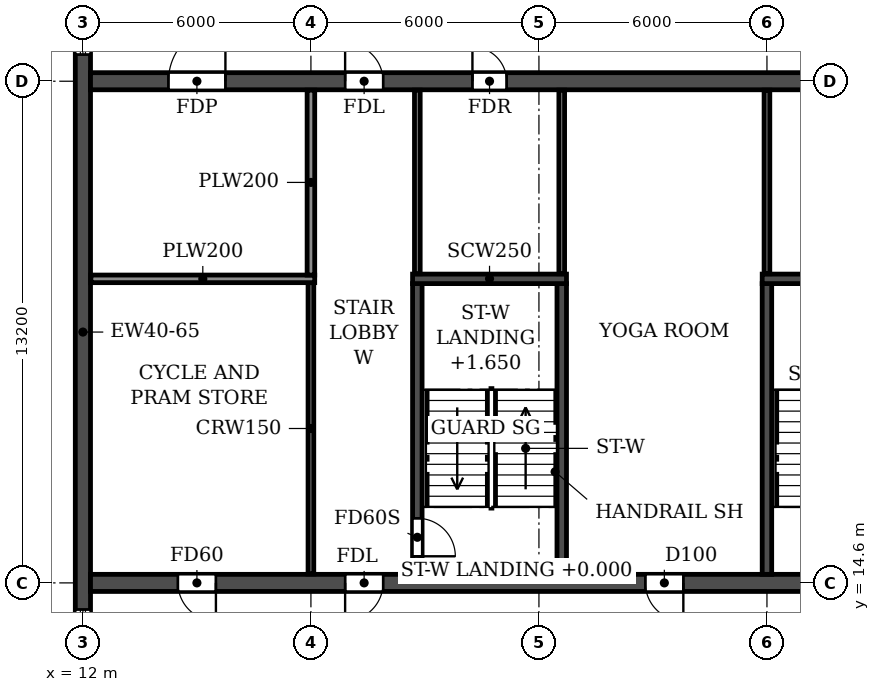
"""IFC4 building model, lengths in metres.
Left out: names, types, materials, properties, quantities, classifications, styles, units other than length and angle.
Written with IfcOpenShell. Run it as: python <this file> out.ifc"""

import sys

from ifc_helpers import new_model, si_unit, direction, frame, frame_2d, origin, place, context, subcontext, project, spatial, rectangle, extrude, element, fill, save


model = new_model("IFC4")
c1 = context("Model", 3, precision=1e-05, world=origin(), true_north=direction((0.0, 1.0)))
c2 = subcontext(c1, "Body", "Model", "MODEL_VIEW")
j1 = project(units=[si_unit("LENGTHUNIT", "METRE"), si_unit("PLANEANGLEUNIT", "RADIAN")], contexts=[c1])
p1 = place(None, origin())
s1 = spatial("IfcSite", under=j1, at=p1, CompositionType="ELEMENT")
p2 = place(p1, origin())
s2 = spatial("IfcBuilding", under=s1, at=p2, CompositionType="ELEMENT")
p3 = place(p2, frame((0.0, 0.0, 132.3)))
s3 = spatial("IfcBuildingStorey", under=s2, at=p3, CompositionType="ELEMENT", Elevation=132.3)
p4 = place(p3, frame((12.0, 4.683, 0.0), z_axis=(0.0, 0.0, 1.0), x_axis=(0.0, 1.0, 0.0)))
e1 = element("IfcWall", 1, at=p4, inside=s3, PredefinedType="SHEAR", context=c2, shape_type="SweptSolid", body=[
    extrude(rectangle(XDim=33.034, YDim=0.4, at=frame_2d((16.517, 0.0))), origin(), (0.0, 0.0, 1.0), 3.07),
])
p5 = place(p4, frame((23.817, 0.0, 0.9)))
e2 = element("IfcOpeningElement", 2, at=p5, cuts=e1, PredefinedType="OPENING", context=c2, shape_type="SweptSolid", body=[
    extrude(rectangle(XDim=1.2, YDim=1.5, at=frame_2d((0.6, 0.75))), frame((0.0, 0.21, 0.0), z_axis=(0.0, -1.0, 0.0), x_axis=(1.0, 0.0, 0.0)), (0.0, 0.0, 1.0), 0.42),
])
p6 = place(p4, frame((8.017, 0.0, 0.9)))
e3 = element("IfcOpeningElement", 3, at=p6, cuts=e1, PredefinedType="OPENING", context=c2, shape_type="SweptSolid", body=[
    extrude(rectangle(XDim=1.2, YDim=1.5, at=frame_2d((0.6, 0.75))), frame((0.0, 0.21, 0.0), z_axis=(0.0, -1.0, 0.0), x_axis=(1.0, 0.0, 0.0)), (0.0, 0.0, 1.0), 0.42),
])
p7 = place(p4, frame((28.293, 0.0, 0.6)))
e4 = element("IfcOpeningElement", 4, at=p7, cuts=e1, PredefinedType="OPENING", context=c2, shape_type="SweptSolid", body=[
    extrude(rectangle(XDim=2.2, YDim=1.8, at=frame_2d((1.1, 0.9))), frame((0.0, 0.21, 0.0), z_axis=(0.0, -1.0, 0.0), x_axis=(1.0, 0.0, 0.0)), (0.0, 0.0, 1.0), 0.42),
])
p8 = place(p4, frame((2.541, 0.0, 0.6)))
e5 = element("IfcOpeningElement", 5, at=p8, cuts=e1, PredefinedType="OPENING", context=c2, shape_type="SweptSolid", body=[
    extrude(rectangle(XDim=2.2, YDim=1.8, at=frame_2d((1.1, 0.9))), frame((0.0, 0.21, 0.0), z_axis=(0.0, -1.0, 0.0), x_axis=(1.0, 0.0, 0.0)), (0.0, 0.0, 1.0), 0.42),
])
p9 = place(p3, frame((12.2, 14.6, 0.0), z_axis=(0.0, 0.0, 1.0), x_axis=(1.0, 0.0, 0.0)))
e6 = element("IfcWall", 6, at=p9, inside=s3, PredefinedType="SOLIDWALL", context=c2, shape_type="SweptSolid", body=[
    extrude(rectangle(XDim=77.6, YDim=0.45, at=frame_2d((38.8, 0.0))), origin(), (0.0, 0.0, 1.0), 3.07),
])
p10 = place(p9, frame((2.3, 0.0, 0.0)))
e7 = element("IfcOpeningElement", 7, at=p10, cuts=e6, PredefinedType="OPENING", context=c2, shape_type="SweptSolid", body=[
    extrude(rectangle(XDim=1.0, YDim=2.1, at=frame_2d((0.5, 1.05))), frame((0.0, 0.235, 0.0), z_axis=(0.0, -1.0, 0.0), x_axis=(1.0, 0.0, 0.0)), (0.0, 0.0, 1.0), 0.47),
])
p11 = place(p9, frame((6.7, 0.0, 0.0)))
e8 = element("IfcOpeningElement", 8, at=p11, cuts=e6, PredefinedType="OPENING", context=c2, shape_type="SweptSolid", body=[
    extrude(rectangle(XDim=1.0, YDim=2.1, at=frame_2d((0.5, 1.05))), frame((0.0, 0.235, 0.0), z_axis=(0.0, -1.0, 0.0), x_axis=(1.0, 0.0, 0.0)), (0.0, 0.0, 1.0), 0.47),
])
p12 = place(p9, frame((14.6, 0.0, 0.0)))
e9 = element("IfcOpeningElement", 9, at=p12, cuts=e6, PredefinedType="OPENING", context=c2, shape_type="SweptSolid", body=[
    extrude(rectangle(XDim=1.0, YDim=2.1, at=frame_2d((0.5, 1.05))), frame((0.0, 0.235, 0.0), z_axis=(0.0, -1.0, 0.0), x_axis=(1.0, 0.0, 0.0)), (0.0, 0.0, 1.0), 0.47),
])
p13 = place(p9, frame((19.2, 0.0, 0.0)))
e10 = element("IfcOpeningElement", 10, at=p13, cuts=e6, PredefinedType="OPENING", context=c2, shape_type="SweptSolid", body=[
    extrude(rectangle(XDim=1.0, YDim=2.1, at=frame_2d((0.5, 1.05))), frame((0.0, 0.235, 0.0), z_axis=(0.0, -1.0, 0.0), x_axis=(1.0, 0.0, 0.0)), (0.0, 0.0, 1.0), 0.47),
])
p14 = place(p9, frame((31.55, 0.0, 0.0)))
e11 = element("IfcOpeningElement", 11, at=p14, cuts=e6, PredefinedType="OPENING", context=c2, shape_type="SweptSolid", body=[
    extrude(rectangle(XDim=1.5, YDim=2.1, at=frame_2d((0.75, 1.05))), frame((0.0, 0.235, 0.0), z_axis=(0.0, -1.0, 0.0), x_axis=(1.0, 0.0, 0.0)), (0.0, 0.0, 1.0), 0.47),
])
p15 = place(p9, frame((35.7, 0.0, 0.0)))
e12 = element("IfcOpeningElement", 12, at=p15, cuts=e6, PredefinedType="OPENING", context=c2, shape_type="SweptSolid", body=[
    extrude(rectangle(XDim=1.0, YDim=2.1, at=frame_2d((0.5, 1.05))), frame((0.0, 0.235, 0.0), z_axis=(0.0, -1.0, 0.0), x_axis=(1.0, 0.0, 0.0)), (0.0, 0.0, 1.0), 0.47),
])
p16 = place(p9, frame((38.3, 0.0, 0.0)))
e13 = element("IfcOpeningElement", 13, at=p16, cuts=e6, PredefinedType="OPENING", context=c2, shape_type="SweptSolid", body=[
    extrude(rectangle(XDim=1.0, YDim=2.1, at=frame_2d((0.5, 1.05))), frame((0.0, 0.235, 0.0), z_axis=(0.0, -1.0, 0.0), x_axis=(1.0, 0.0, 0.0)), (0.0, 0.0, 1.0), 0.47),
])
p17 = place(p9, frame((40.9, 0.0, 0.0)))
e14 = element("IfcOpeningElement", 14, at=p17, cuts=e6, PredefinedType="OPENING", context=c2, shape_type="SweptSolid", body=[
    extrude(rectangle(XDim=1.0, YDim=2.1, at=frame_2d((0.5, 1.05))), frame((0.0, 0.235, 0.0), z_axis=(0.0, -1.0, 0.0), x_axis=(1.0, 0.0, 0.0)), (0.0, 0.0, 1.0), 0.47),
])
p18 = place(p9, frame((44.55, 0.0, 0.0)))
e15 = element("IfcOpeningElement", 15, at=p18, cuts=e6, PredefinedType="OPENING", context=c2, shape_type="SweptSolid", body=[
    extrude(rectangle(XDim=1.5, YDim=2.1, at=frame_2d((0.75, 1.05))), frame((0.0, 0.235, 0.0), z_axis=(0.0, -1.0, 0.0), x_axis=(1.0, 0.0, 0.0)), (0.0, 0.0, 1.0), 0.47),
])
p19 = place(p9, frame((57.4, 0.0, 0.0)))
e16 = element("IfcOpeningElement", 16, at=p19, cuts=e6, PredefinedType="OPENING", context=c2, shape_type="SweptSolid", body=[
    extrude(rectangle(XDim=1.0, YDim=2.1, at=frame_2d((0.5, 1.05))), frame((0.0, 0.235, 0.0), z_axis=(0.0, -1.0, 0.0), x_axis=(1.0, 0.0, 0.0)), (0.0, 0.0, 1.0), 0.47),
])
p20 = place(p9, frame((62.0, 0.0, 0.0)))
e17 = element("IfcOpeningElement", 17, at=p20, cuts=e6, PredefinedType="OPENING", context=c2, shape_type="SweptSolid", body=[
    extrude(rectangle(XDim=1.0, YDim=2.1, at=frame_2d((0.5, 1.05))), frame((0.0, 0.235, 0.0), z_axis=(0.0, -1.0, 0.0), x_axis=(1.0, 0.0, 0.0)), (0.0, 0.0, 1.0), 0.47),
])
p21 = place(p9, frame((69.9, 0.0, 0.0)))
e18 = element("IfcOpeningElement", 18, at=p21, cuts=e6, PredefinedType="OPENING", context=c2, shape_type="SweptSolid", body=[
    extrude(rectangle(XDim=1.0, YDim=2.1, at=frame_2d((0.5, 1.05))), frame((0.0, 0.235, 0.0), z_axis=(0.0, -1.0, 0.0), x_axis=(1.0, 0.0, 0.0)), (0.0, 0.0, 1.0), 0.47),
])
p22 = place(p9, frame((74.3, 0.0, 0.0)))
e19 = element("IfcOpeningElement", 19, at=p22, cuts=e6, PredefinedType="OPENING", context=c2, shape_type="SweptSolid", body=[
    extrude(rectangle(XDim=1.0, YDim=2.1, at=frame_2d((0.5, 1.05))), frame((0.0, 0.235, 0.0), z_axis=(0.0, -1.0, 0.0), x_axis=(1.0, 0.0, 0.0)), (0.0, 0.0, 1.0), 0.47),
])
p23 = place(p3, frame((12.2, 27.8, 0.0), z_axis=(0.0, 0.0, 1.0), x_axis=(1.0, 0.0, 0.0)))
e20 = element("IfcWall", 20, at=p23, inside=s3, PredefinedType="SOLIDWALL", context=c2, shape_type="SweptSolid", body=[
    extrude(rectangle(XDim=77.6, YDim=0.45, at=frame_2d((38.8, 0.0))), origin(), (0.0, 0.0, 1.0), 3.07),
])
p24 = place(p23, frame((2.05, 0.0, 0.0)))
e21 = element("IfcOpeningElement", 21, at=p24, cuts=e20, PredefinedType="OPENING", context=c2, shape_type="SweptSolid", body=[
    extrude(rectangle(XDim=1.5, YDim=2.1, at=frame_2d((0.75, 1.05))), frame((0.0, 0.235, 0.0), z_axis=(0.0, -1.0, 0.0), x_axis=(1.0, 0.0, 0.0)), (0.0, 0.0, 1.0), 0.47),
])
p25 = place(p23, frame((6.7, 0.0, 0.0)))
e22 = element("IfcOpeningElement", 22, at=p25, cuts=e20, PredefinedType="OPENING", context=c2, shape_type="SweptSolid", body=[
    extrude(rectangle(XDim=1.0, YDim=2.1, at=frame_2d((0.5, 1.05))), frame((0.0, 0.235, 0.0), z_axis=(0.0, -1.0, 0.0), x_axis=(1.0, 0.0, 0.0)), (0.0, 0.0, 1.0), 0.47),
])
p26 = place(p23, frame((10.05, 0.0, 0.0)))
e23 = element("IfcOpeningElement", 23, at=p26, cuts=e20, PredefinedType="OPENING", context=c2, shape_type="SweptSolid", body=[
    extrude(rectangle(XDim=0.9, YDim=2.1, at=frame_2d((0.45, 1.05))), frame((0.0, 0.235, 0.0), z_axis=(0.0, -1.0, 0.0), x_axis=(1.0, 0.0, 0.0)), (0.0, 0.0, 1.0), 0.47),
])
p27 = place(p23, frame((19.25, 0.0, 0.0)))
e24 = element("IfcOpeningElement", 24, at=p27, cuts=e20, PredefinedType="OPENING", context=c2, shape_type="SweptSolid", body=[
    extrude(rectangle(XDim=0.9, YDim=2.1, at=frame_2d((0.45, 1.05))), frame((0.0, 0.235, 0.0), z_axis=(0.0, -1.0, 0.0), x_axis=(1.0, 0.0, 0.0)), (0.0, 0.0, 1.0), 0.47),
])
p28 = place(p23, frame((22.4, 0.0, 0.0)))
e25 = element("IfcOpeningElement", 25, at=p28, cuts=e20, PredefinedType="OPENING", context=c2, shape_type="SweptSolid", body=[
    extrude(rectangle(XDim=1.0, YDim=2.1, at=frame_2d((0.5, 1.05))), frame((0.0, 0.235, 0.0), z_axis=(0.0, -1.0, 0.0), x_axis=(1.0, 0.0, 0.0)), (0.0, 0.0, 1.0), 0.47),
])
p29 = place(p23, frame((27.6, 0.0, 0.0)))
e26 = element("IfcOpeningElement", 26, at=p29, cuts=e20, PredefinedType="OPENING", context=c2, shape_type="SweptSolid", body=[
    extrude(rectangle(XDim=1.0, YDim=2.1, at=frame_2d((0.5, 1.05))), frame((0.0, 0.235, 0.0), z_axis=(0.0, -1.0, 0.0), x_axis=(1.0, 0.0, 0.0)), (0.0, 0.0, 1.0), 0.47),
])
p30 = place(p23, frame((35.4, 0.0, 0.0)))
e27 = element("IfcOpeningElement", 27, at=p30, cuts=e20, PredefinedType="OPENING", context=c2, shape_type="SweptSolid", body=[
    extrude(rectangle(XDim=1.0, YDim=2.1, at=frame_2d((0.5, 1.05))), frame((0.0, 0.235, 0.0), z_axis=(0.0, -1.0, 0.0), x_axis=(1.0, 0.0, 0.0)), (0.0, 0.0, 1.0), 0.47),
])
p31 = place(p23, frame((38.3, 0.0, 0.0)))
e28 = element("IfcOpeningElement", 28, at=p31, cuts=e20, PredefinedType="OPENING", context=c2, shape_type="SweptSolid", body=[
    extrude(rectangle(XDim=1.0, YDim=2.1, at=frame_2d((0.5, 1.05))), frame((0.0, 0.235, 0.0), z_axis=(0.0, -1.0, 0.0), x_axis=(1.0, 0.0, 0.0)), (0.0, 0.0, 1.0), 0.47),
])
p32 = place(p23, frame((41.2, 0.0, 0.0)))
e29 = element("IfcOpeningElement", 29, at=p32, cuts=e20, PredefinedType="OPENING", context=c2, shape_type="SweptSolid", body=[
    extrude(rectangle(XDim=1.0, YDim=2.1, at=frame_2d((0.5, 1.05))), frame((0.0, 0.235, 0.0), z_axis=(0.0, -1.0, 0.0), x_axis=(1.0, 0.0, 0.0)), (0.0, 0.0, 1.0), 0.47),
])
p33 = place(p23, frame((43.8, 0.0, 0.0)))
e30 = element("IfcOpeningElement", 30, at=p33, cuts=e20, PredefinedType="OPENING", context=c2, shape_type="SweptSolid", body=[
    extrude(rectangle(XDim=1.0, YDim=2.1, at=frame_2d((0.5, 1.05))), frame((0.0, 0.235, 0.0), z_axis=(0.0, -1.0, 0.0), x_axis=(1.0, 0.0, 0.0)), (0.0, 0.0, 1.0), 0.47),
])
p34 = place(p23, frame((47.7, 0.0, 0.0)))
e31 = element("IfcOpeningElement", 31, at=p34, cuts=e20, PredefinedType="OPENING", context=c2, shape_type="SweptSolid", body=[
    extrude(rectangle(XDim=1.0, YDim=2.1, at=frame_2d((0.5, 1.05))), frame((0.0, 0.235, 0.0), z_axis=(0.0, -1.0, 0.0), x_axis=(1.0, 0.0, 0.0)), (0.0, 0.0, 1.0), 0.47),
])
p35 = place(p23, frame((51.6, 0.0, 0.0)))
e32 = element("IfcOpeningElement", 32, at=p35, cuts=e20, PredefinedType="OPENING", context=c2, shape_type="SweptSolid", body=[
    extrude(rectangle(XDim=1.0, YDim=2.1, at=frame_2d((0.5, 1.05))), frame((0.0, 0.235, 0.0), z_axis=(0.0, -1.0, 0.0), x_axis=(1.0, 0.0, 0.0)), (0.0, 0.0, 1.0), 0.47),
])
p36 = place(p23, frame((54.2, 0.0, 0.0)))
e33 = element("IfcOpeningElement", 33, at=p36, cuts=e20, PredefinedType="OPENING", context=c2, shape_type="SweptSolid", body=[
    extrude(rectangle(XDim=1.0, YDim=2.1, at=frame_2d((0.5, 1.05))), frame((0.0, 0.235, 0.0), z_axis=(0.0, -1.0, 0.0), x_axis=(1.0, 0.0, 0.0)), (0.0, 0.0, 1.0), 0.47),
])
p37 = place(p23, frame((57.45, 0.0, 0.0)))
e34 = element("IfcOpeningElement", 34, at=p37, cuts=e20, PredefinedType="OPENING", context=c2, shape_type="SweptSolid", body=[
    extrude(rectangle(XDim=0.9, YDim=2.1, at=frame_2d((0.45, 1.05))), frame((0.0, 0.235, 0.0), z_axis=(0.0, -1.0, 0.0), x_axis=(1.0, 0.0, 0.0)), (0.0, 0.0, 1.0), 0.47),
])
p38 = place(p23, frame((66.65, 0.0, 0.0)))
e35 = element("IfcOpeningElement", 35, at=p38, cuts=e20, PredefinedType="OPENING", context=c2, shape_type="SweptSolid", body=[
    extrude(rectangle(XDim=0.9, YDim=2.1, at=frame_2d((0.45, 1.05))), frame((0.0, 0.235, 0.0), z_axis=(0.0, -1.0, 0.0), x_axis=(1.0, 0.0, 0.0)), (0.0, 0.0, 1.0), 0.47),
])
p39 = place(p23, frame((69.9, 0.0, 0.0)))
e36 = element("IfcOpeningElement", 36, at=p39, cuts=e20, PredefinedType="OPENING", context=c2, shape_type="SweptSolid", body=[
    extrude(rectangle(XDim=1.0, YDim=2.1, at=frame_2d((0.5, 1.05))), frame((0.0, 0.235, 0.0), z_axis=(0.0, -1.0, 0.0), x_axis=(1.0, 0.0, 0.0)), (0.0, 0.0, 1.0), 0.47),
])
p40 = place(p23, frame((74.3, 0.0, 0.0)))
e37 = element("IfcOpeningElement", 37, at=p40, cuts=e20, PredefinedType="OPENING", context=c2, shape_type="SweptSolid", body=[
    extrude(rectangle(XDim=1.0, YDim=2.1, at=frame_2d((0.5, 1.05))), frame((0.0, 0.235, 0.0), z_axis=(0.0, -1.0, 0.0), x_axis=(1.0, 0.0, 0.0)), (0.0, 0.0, 1.0), 0.47),
])
p41 = place(p3, frame((30.0, 14.825, 0.0), z_axis=(0.0, 0.0, 1.0), x_axis=(0.0, 1.0, 0.0)))
e38 = element("IfcWall", 38, at=p41, inside=s3, PredefinedType="SOLIDWALL", context=c2, shape_type="SweptSolid", body=[
    extrude(rectangle(XDim=7.65, YDim=0.25, at=frame_2d((3.825, 0.0))), origin(), (0.0, 0.0, 1.0), 3.07),
])
p42 = place(p3, frame((29.875, 22.6, 0.0), z_axis=(0.0, 0.0, 1.0), x_axis=(1.0, 0.0, 0.0)))
e39 = element("IfcWall", 39, at=p42, inside=s3, PredefinedType="SOLIDWALL", context=c2, shape_type="SweptSolid", body=[
    extrude(rectangle(XDim=4.05, YDim=0.25, at=frame_2d((2.025, 0.0))), origin(), (0.0, 0.0, 1.0), 3.07),
])
p43 = place(p3, frame((20.8, 14.825, 0.0), z_axis=(0.0, 0.0, 1.0), x_axis=(0.0, 1.0, 0.0)))
e40 = element("IfcWall", 40, at=p43, inside=s3, PredefinedType="SOLIDWALL", context=c2, shape_type="SweptSolid", body=[
    extrude(rectangle(XDim=7.65, YDim=0.25, at=frame_2d((3.825, 0.0))), origin(), (0.0, 0.0, 1.0), 3.07),
])
p44 = place(p43, frame((0.475, 0.0, 0.0)))
e41 = element("IfcOpeningElement", 41, at=p44, cuts=e40, PredefinedType="OPENING", context=c2, shape_type="SweptSolid", body=[
    extrude(rectangle(XDim=1.0, YDim=2.1, at=frame_2d((0.5, 1.05))), frame((0.0, 0.135, 0.0), z_axis=(0.0, -1.0, 0.0), x_axis=(1.0, 0.0, 0.0)), (0.0, 0.0, 1.0), 0.27),
])
p45 = place(p3, frame((24.6, 14.825, 0.0), z_axis=(0.0, 0.0, 1.0), x_axis=(0.0, 1.0, 0.0)))
e42 = element("IfcWall", 42, at=p45, inside=s3, PredefinedType="SOLIDWALL", context=c2, shape_type="SweptSolid", body=[
    extrude(rectangle(XDim=7.65, YDim=0.25, at=frame_2d((3.825, 0.0))), origin(), (0.0, 0.0, 1.0), 3.07),
])
p46 = place(p3, frame((20.675, 22.6, 0.0), z_axis=(0.0, 0.0, 1.0), x_axis=(1.0, 0.0, 0.0)))
e43 = element("IfcWall", 43, at=p46, inside=s3, PredefinedType="SOLIDWALL", context=c2, shape_type="SweptSolid", body=[
    extrude(rectangle(XDim=4.05, YDim=0.25, at=frame_2d((2.025, 0.0))), origin(), (0.0, 0.0, 1.0), 3.07),
])
p47 = place(p3, frame((18.0, 14.835, 0.0), z_axis=(0.0, 0.0, 1.0), x_axis=(0.0, 1.0, 0.0)))
e44 = element("IfcWall", 44, at=p47, inside=s3, PredefinedType="PARTITIONING", context=c2, shape_type="SweptSolid", body=[
    extrude(rectangle(XDim=7.665, YDim=0.15, at=frame_2d((3.833, 0.0))), origin(), (0.0, 0.0, 1.0), 3.07),
])
p48 = place(p3, frame((12.21, 22.6, 0.0), z_axis=(0.0, 0.0, 1.0), x_axis=(1.0, 0.0, 0.0)))
e45 = element("IfcWall", 45, at=p48, inside=s3, PredefinedType="PARTITIONING", context=c2, shape_type="SweptSolid", body=[
    extrude(rectangle(XDim=5.89, YDim=0.2, at=frame_2d((2.945, 0.0))), origin(), (0.0, 0.0, 1.0), 3.07),
])
p49 = place(p3, frame((18.0, 22.7, 0.0), z_axis=(0.0, 0.0, 1.0), x_axis=(0.0, 1.0, 0.0)))
e46 = element("IfcWall", 46, at=p49, inside=s3, PredefinedType="PARTITIONING", context=c2, shape_type="SweptSolid", body=[
    extrude(rectangle(XDim=4.865, YDim=0.2, at=frame_2d((2.433, 0.0))), origin(), (0.0, 0.0, 1.0), 3.07),
])
for number, where, z_axis, x_axis in (
    (47, (20.8, 22.735, 0.0), (0.0, 0.0, 1.0), (0.0, 1.0, 0.0)),
    (48, (24.6, 22.735, 0.0), (0.0, 0.0, 1.0), (0.0, 1.0, 0.0)),
    (49, (30.0, 22.735, 0.0), (0.0, 0.0, 1.0), (0.0, 1.0, 0.0)),
):
    element("IfcWall", number, at=place(p3, frame(where, z_axis=z_axis, x_axis=x_axis)), inside=s3, PredefinedType="PARTITIONING", context=c2, shape_type="SweptSolid", body=[
        extrude(rectangle(XDim=4.83, YDim=0.15, at=frame_2d((2.415, 0.0))), origin(), (0.0, 0.0, 1.0), 3.07),
    ])
p50 = place(p5, origin())
e50 = element("IfcWindow", 50, at=p50, inside=s3, PartitioningType="SINGLE_PANEL", PredefinedType="WINDOW", context=c2, shape_type="SweptSolid", body=[
    extrude(rectangle(XDim=1.2, YDim=1.5, at=frame_2d((0.6, 0.75))), frame((0.0, 0.03, 0.0), z_axis=(0.0, -1.0, 0.0), x_axis=(1.0, 0.0, 0.0)), (0.0, 0.0, 1.0), 0.06),
])
fill(e2, e50)
p51 = place(p6, origin())
e51 = element("IfcWindow", 51, at=p51, inside=s3, PartitioningType="SINGLE_PANEL", PredefinedType="WINDOW", context=c2, shape_type="SweptSolid", body=[
    extrude(rectangle(XDim=1.2, YDim=1.5, at=frame_2d((0.6, 0.75))), frame((0.0, 0.03, 0.0), z_axis=(0.0, -1.0, 0.0), x_axis=(1.0, 0.0, 0.0)), (0.0, 0.0, 1.0), 0.06),
])
fill(e3, e51)
p52 = place(p24, origin())
e52 = element("IfcDoor", 52, at=p52, inside=s3, OperationType="DOUBLE_DOOR_SINGLE_SWING", PredefinedType="DOOR", context=c2, shape_type="SweptSolid", body=[
    extrude(rectangle(XDim=1.5, YDim=2.1, at=frame_2d((0.75, 1.05))), frame((0.0, 0.025, 0.0), z_axis=(0.0, -1.0, 0.0), x_axis=(1.0, 0.0, 0.0)), (0.0, 0.0, 1.0), 0.05),
])
fill(e21, e52)
p53 = place(p25, origin())
e53 = element("IfcDoor", 53, at=p53, inside=s3, OperationType="SINGLE_SWING_LEFT", PredefinedType="DOOR", context=c2, shape_type="SweptSolid", body=[
    extrude(rectangle(XDim=1.0, YDim=2.1, at=frame_2d((0.5, 1.05))), frame((0.0, 0.025, 0.0), z_axis=(0.0, -1.0, 0.0), x_axis=(1.0, 0.0, 0.0)), (0.0, 0.0, 1.0), 0.05),
])
fill(e22, e53)
p54 = place(p26, origin())
e54 = element("IfcDoor", 54, at=p54, inside=s3, OperationType="SINGLE_SWING_LEFT", PredefinedType="DOOR", context=c2, shape_type="SweptSolid", body=[
    extrude(rectangle(XDim=0.9, YDim=2.1, at=frame_2d((0.45, 1.05))), frame((0.0, 0.025, 0.0), z_axis=(0.0, -1.0, 0.0), x_axis=(1.0, 0.0, 0.0)), (0.0, 0.0, 1.0), 0.05),
])
fill(e23, e54)
p55 = place(p10, frame((1.0, 0.0, 0.0), z_axis=(0.0, 0.0, 1.0), x_axis=(-1.0, 0.0, 0.0)))
e55 = element("IfcDoor", 55, at=p55, inside=s3, OperationType="SINGLE_SWING_LEFT", PredefinedType="DOOR", context=c2, shape_type="SweptSolid", body=[
    extrude(rectangle(XDim=1.0, YDim=2.1, at=frame_2d((0.5, 1.05))), frame((0.0, 0.025, 0.0), z_axis=(0.0, -1.0, 0.0), x_axis=(1.0, 0.0, 0.0)), (0.0, 0.0, 1.0), 0.05),
])
fill(e7, e55)
p56 = place(p11, frame((1.0, 0.0, 0.0), z_axis=(0.0, 0.0, 1.0), x_axis=(-1.0, 0.0, 0.0)))
e56 = element("IfcDoor", 56, at=p56, inside=s3, OperationType="SINGLE_SWING_RIGHT", PredefinedType="DOOR", context=c2, shape_type="SweptSolid", body=[
    extrude(rectangle(XDim=1.0, YDim=2.1, at=frame_2d((0.5, 1.05))), frame((0.0, 0.025, 0.0), z_axis=(0.0, -1.0, 0.0), x_axis=(1.0, 0.0, 0.0)), (0.0, 0.0, 1.0), 0.05),
])
fill(e8, e56)
p57 = place(p12, frame((1.0, 0.0, 0.0), z_axis=(0.0, 0.0, 1.0), x_axis=(-1.0, 0.0, 0.0)))
e57 = element("IfcDoor", 57, at=p57, inside=s3, OperationType="SINGLE_SWING_LEFT", PredefinedType="DOOR", context=c2, shape_type="SweptSolid", body=[
    extrude(rectangle(XDim=1.0, YDim=2.1, at=frame_2d((0.5, 1.05))), frame((0.0, 0.025, 0.0), z_axis=(0.0, -1.0, 0.0), x_axis=(1.0, 0.0, 0.0)), (0.0, 0.0, 1.0), 0.05),
])
fill(e9, e57)
p58 = place(p44, frame((1.0, 0.0, 0.0), z_axis=(0.0, 0.0, 1.0), x_axis=(-1.0, 0.0, 0.0)))
e58 = element("IfcDoor", 58, at=p58, inside=s3, OperationType="SINGLE_SWING_RIGHT", PredefinedType="DOOR", context=c2, shape_type="SweptSolid", body=[
    extrude(rectangle(XDim=1.0, YDim=2.1, at=frame_2d((0.5, 1.05))), frame((0.0, 0.025, 0.0), z_axis=(0.0, -1.0, 0.0), x_axis=(1.0, 0.0, 0.0)), (0.0, 0.0, 1.0), 0.05),
])
fill(e41, e58)
save(model, sys.argv[1])
